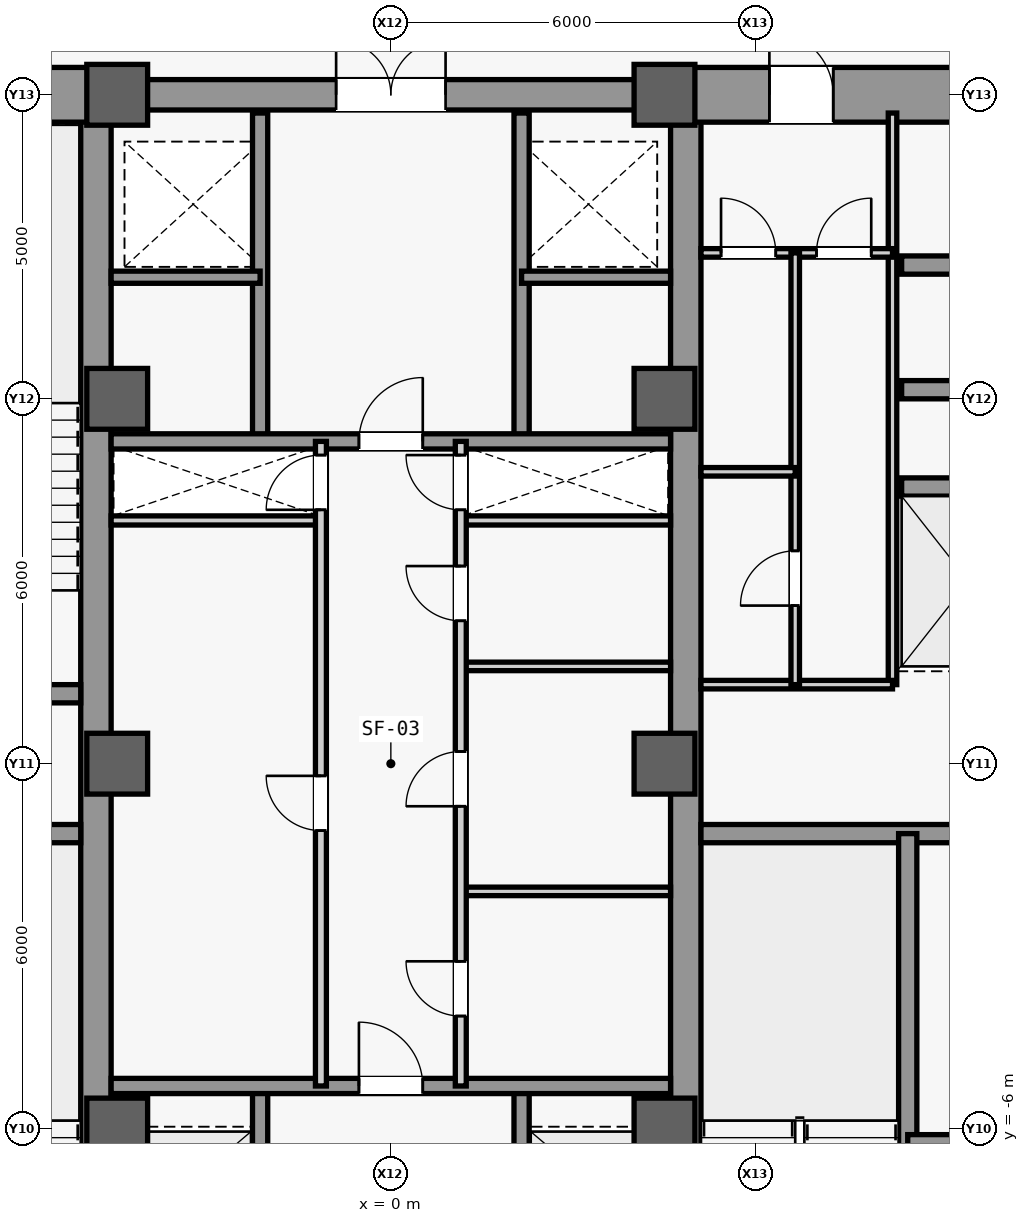
"""IFC4 building model, lengths in metres.
Left out: names, types, materials, properties, quantities, classifications, styles, units other than length and angle.
Written with IfcOpenShell. Run it as: python <this file> out.ifc"""

import sys

from ifc_helpers import new_model, si_unit, direction, frame, frame_2d, origin, origin_2d, place, context, subcontext, project, spatial, rectangle, extrude, source, transform, mapped, element, fill, save


model = new_model("IFC4")
c1 = context("Model", 3, precision=1e-05, world=origin(), true_north=direction((0.0, 1.0)))
c2 = subcontext(c1, "Body", "Model", "MODEL_VIEW")
j1 = project(units=[si_unit("LENGTHUNIT", "METRE"), si_unit("PLANEANGLEUNIT", "RADIAN")], contexts=[c1])
p1 = place(None, origin())
s1 = spatial("IfcSite", under=j1, at=p1, CompositionType="ELEMENT")
p2 = place(p1, origin())
s2 = spatial("IfcBuilding", under=s1, at=p2, CompositionType="ELEMENT")
p3 = place(p2, frame((0.0, 0.0, 45.2)))
s3 = spatial("IfcBuildingStorey", under=s2, at=p3, CompositionType="ELEMENT", Elevation=45.2)
m1 = source(origin(), c2, "Body", "SweptSolid", [
    extrude(rectangle(XDim=21.4, YDim=0.5, at=frame_2d((10.7, 0.0))), origin(), (0.0, 0.0, 1.0), 3.94),
])
for number, where, z_axis, x_axis in (
    (1, (-4.85, -10.7, 0.0), (0.0, 0.0, 1.0), (0.0, 1.0, 0.0)),
    (2, (4.85, -10.7, 0.0), (0.0, 0.0, 1.0), (0.0, 1.0, 0.0)),
):
    element("IfcWall", number, at=place(p3, frame(where, z_axis=z_axis, x_axis=x_axis)), inside=s3, PredefinedType="SHEAR", context=c2, shape_type="MappedRepresentation", body=[
        mapped(m1, transform((0.0, 0.0, 0.0), scale=1.0)),
    ])
m2 = source(origin(), c2, "Body", "SweptSolid", [
    extrude(rectangle(XDim=5.85, YDim=0.9, at=frame_2d((2.925, 0.0))), origin(), (0.0, 0.0, 1.0), 3.94),
])
p4 = place(p3, frame((-10.7, 11.0, 0.0), z_axis=(0.0, 0.0, 1.0), x_axis=(1.0, 0.0, 0.0)))
e3 = element("IfcWall", 3, at=p4, inside=s3, PredefinedType="SHEAR", context=c2, shape_type="MappedRepresentation", body=[
    mapped(m2, transform((0.0, 0.0, 0.0), scale=1.0)),
])
p5 = place(p3, frame((4.85, 11.0, 0.0), z_axis=(0.0, 0.0, 1.0), x_axis=(1.0, 0.0, 0.0)))
e4 = element("IfcWall", 4, at=p5, inside=s3, PredefinedType="SHEAR", context=c2, shape_type="MappedRepresentation", body=[
    mapped(m2, transform((0.0, 0.0, 0.0), scale=1.0)),
])
m3 = source(origin(), c2, "Body", "SweptSolid", [
    extrude(rectangle(XDim=1.05, YDim=2.2, at=frame_2d((0.525, 1.1))), frame((0.0, 0.46, 0.0), z_axis=(0.0, -1.0, 0.0), x_axis=(1.0, 0.0, 0.0)), (0.0, 0.0, 1.0), 0.92),
])
p6 = place(p5, frame((1.375, 0.0, 0.0)))
e5 = element("IfcOpeningElement", 5, at=p6, cuts=e4, PredefinedType="OPENING", context=c2, shape_type="MappedRepresentation", body=[
    mapped(m3, transform((0.0, 0.0, 0.0), scale=1.0)),
])
m4 = source(origin(), c2, "Body", "SweptSolid", [
    extrude(rectangle(XDim=5.6, YDim=0.3, at=frame_2d((2.8, 0.0))), origin(), (0.0, 0.0, 1.0), 3.94),
])
for number, where, z_axis, x_axis in (
    (6, (-10.7, -1.15, 0.0), (0.0, 0.0, 1.0), (1.0, 0.0, 0.0)),
    (7, (-10.7, 1.15, 0.0), (0.0, 0.0, 1.0), (1.0, 0.0, 0.0)),
    (8, (5.1, -1.15, 0.0), (0.0, 0.0, 1.0), (1.0, 0.0, 0.0)),
):
    element("IfcWall", number, at=place(p3, frame(where, z_axis=z_axis, x_axis=x_axis)), inside=s3, PredefinedType="SHEAR", context=c2, shape_type="MappedRepresentation", body=[
        mapped(m4, transform((0.0, 0.0, 0.0), scale=1.0)),
    ])
m5 = source(origin(), c2, "Body", "SweptSolid", [
    extrude(rectangle(XDim=9.2, YDim=0.5, at=frame_2d((4.6, 0.0))), origin(), (0.0, 0.0, 1.0), 3.94),
])
p7 = place(p3, frame((-4.6, 11.0, 0.0), z_axis=(0.0, 0.0, 1.0), x_axis=(1.0, 0.0, 0.0)))
e9 = element("IfcWall", 9, at=p7, inside=s3, PredefinedType="SHEAR", context=c2, shape_type="MappedRepresentation", body=[
    mapped(m5, transform((0.0, 0.0, 0.0), scale=1.0)),
])
m6 = source(origin(), c2, "Body", "SweptSolid", [
    extrude(rectangle(XDim=1.8, YDim=2.25, at=frame_2d((0.9, 1.125))), frame((0.0, 0.26, 0.0), z_axis=(0.0, -1.0, 0.0), x_axis=(1.0, 0.0, 0.0)), (0.0, 0.0, 1.0), 0.52),
])
p8 = place(p7, frame((3.7, 0.0, 0.0)))
e10 = element("IfcOpeningElement", 10, at=p8, cuts=e9, PredefinedType="OPENING", context=c2, shape_type="MappedRepresentation", body=[
    mapped(m6, transform((0.0, 0.0, 0.0), scale=1.0)),
])
m7 = source(origin(), c2, "Body", "SweptSolid", [
    extrude(rectangle(XDim=1.0, YDim=1.0, at=origin_2d()), origin(), (0.0, 0.0, 1.0), 4.2),
])
for number, where, z_axis, x_axis in (
    (11, (-4.5, -6.0, 0.0), (0.0, 0.0, 1.0), (1.0, 0.0, 0.0)),
    (12, (-4.5, 0.0, 0.0), (0.0, 0.0, 1.0), (1.0, 0.0, 0.0)),
    (13, (-4.5, 6.0, 0.0), (0.0, 0.0, 1.0), (1.0, 0.0, 0.0)),
    (14, (-4.5, 11.0, 0.0), (0.0, 0.0, 1.0), (1.0, 0.0, 0.0)),
    (15, (4.5, -6.0, 0.0), (0.0, 0.0, 1.0), (1.0, 0.0, 0.0)),
    (16, (4.5, 0.0, 0.0), (0.0, 0.0, 1.0), (1.0, 0.0, 0.0)),
    (17, (4.5, 6.0, 0.0), (0.0, 0.0, 1.0), (1.0, 0.0, 0.0)),
    (18, (4.5, 11.0, 0.0), (0.0, 0.0, 1.0), (1.0, 0.0, 0.0)),
):
    element("IfcColumn", number, at=place(p3, frame(where, z_axis=z_axis, x_axis=x_axis)), inside=s3, PredefinedType="COLUMN", context=c2, shape_type="MappedRepresentation", body=[
        mapped(m7, transform((0.0, 0.0, 0.0), scale=1.0)),
    ])
m8 = source(origin(), c2, "Body", "SweptSolid", [
    extrude(rectangle(XDim=7.8, YDim=0.3, at=frame_2d((3.9, 0.0))), origin(), (0.0, 0.0, 1.0), 3.94),
])
p9 = place(p3, frame((8.5, -8.95, 0.0), z_axis=(0.0, 0.0, 1.0), x_axis=(0.0, 1.0, 0.0)))
e19 = element("IfcWall", 19, at=p9, inside=s3, PredefinedType="SHEAR", context=c2, shape_type="MappedRepresentation", body=[
    mapped(m8, transform((0.0, 0.0, 0.0), scale=1.0)),
])
m9 = source(origin(), c2, "Body", "SweptSolid", [
    extrude(rectangle(XDim=2.2, YDim=0.3, at=frame_2d((1.1, 0.0))), origin(), (0.0, 0.0, 1.0), 3.94),
])
p10 = place(p3, frame((8.5, -6.25, 0.0), z_axis=(0.0, 0.0, 1.0), x_axis=(1.0, 0.0, 0.0)))
e20 = element("IfcWall", 20, at=p10, inside=s3, PredefinedType="SHEAR", context=c2, shape_type="MappedRepresentation", body=[
    mapped(m9, transform((0.0, 0.0, 0.0), scale=1.0)),
])
m10 = source(origin(), c2, "Body", "SweptSolid", [
    extrude(rectangle(XDim=2.3, YDim=0.3, at=frame_2d((1.15, 0.0))), origin(), (0.0, 0.0, 1.0), 3.94),
])
for number, where, z_axis, x_axis in (
    (21, (8.4, 4.55, 0.0), (0.0, 0.0, 1.0), (1.0, 0.0, 0.0)),
    (22, (8.4, 6.15, 0.0), (0.0, 0.0, 1.0), (1.0, 0.0, 0.0)),
    (23, (8.4, 8.2, 0.0), (0.0, 0.0, 1.0), (1.0, 0.0, 0.0)),
):
    element("IfcWall", number, at=place(p3, frame(where, z_axis=z_axis, x_axis=x_axis)), inside=s3, PredefinedType="SHEAR", context=c2, shape_type="MappedRepresentation", body=[
        mapped(m10, transform((0.0, 0.0, 0.0), scale=1.0)),
    ])
m11 = source(origin(), c2, "Body", "SweptSolid", [
    extrude(rectangle(XDim=9.4, YDim=0.14, at=frame_2d((4.7, 0.0))), origin(), (0.0, 0.0, 1.0), 3.94),
])
p11 = place(p3, frame((8.25, 1.3, 0.0), z_axis=(0.0, 0.0, 1.0), x_axis=(0.0, 1.0, 0.0)))
e24 = element("IfcWall", 24, at=p11, inside=s3, PredefinedType="PARTITIONING", context=c2, shape_type="MappedRepresentation", body=[
    mapped(m11, transform((0.0, 0.0, 0.0), scale=1.0)),
])
m12 = source(origin(), c2, "Body", "SweptSolid", [
    extrude(rectangle(XDim=3.15, YDim=0.14, at=frame_2d((1.575, 0.0))), origin(), (0.0, 0.0, 1.0), 3.94),
])
p12 = place(p3, frame((5.1, 1.3, 0.0), z_axis=(0.0, 0.0, 1.0), x_axis=(1.0, 0.0, 0.0)))
e25 = element("IfcWall", 25, at=p12, inside=s3, PredefinedType="PARTITIONING", context=c2, shape_type="MappedRepresentation", body=[
    mapped(m12, transform((0.0, 0.0, 0.0), scale=1.0)),
])
p13 = place(p3, frame((5.1, 8.4, 0.0), z_axis=(0.0, 0.0, 1.0), x_axis=(1.0, 0.0, 0.0)))
e26 = element("IfcWall", 26, at=p13, inside=s3, PredefinedType="PARTITIONING", context=c2, shape_type="MappedRepresentation", body=[
    mapped(m12, transform((0.0, 0.0, 0.0), scale=1.0)),
])
m13 = source(origin(), c2, "Body", "SweptSolid", [
    extrude(rectangle(XDim=0.9, YDim=2.15, at=frame_2d((0.45, 1.075))), frame((0.0, 0.08, 0.0), z_axis=(0.0, -1.0, 0.0), x_axis=(1.0, 0.0, 0.0)), (0.0, 0.0, 1.0), 0.16),
])
p14 = place(p13, frame((0.33, 0.0, 0.0)))
e27 = element("IfcOpeningElement", 27, at=p14, cuts=e26, PredefinedType="OPENING", context=c2, shape_type="MappedRepresentation", body=[
    mapped(m13, transform((0.0, 0.0, 0.0), scale=1.0)),
])
p15 = place(p13, frame((1.9, 0.0, 0.0)))
e28 = element("IfcOpeningElement", 28, at=p15, cuts=e26, PredefinedType="OPENING", context=c2, shape_type="MappedRepresentation", body=[
    mapped(m13, transform((0.0, 0.0, 0.0), scale=1.0)),
])
m14 = source(origin(), c2, "Body", "SweptSolid", [
    extrude(rectangle(XDim=7.1, YDim=0.14, at=frame_2d((3.55, 0.0))), origin(), (0.0, 0.0, 1.0), 3.94),
])
p16 = place(p3, frame((6.65, 1.3, 0.0), z_axis=(0.0, 0.0, 1.0), x_axis=(0.0, 1.0, 0.0)))
e29 = element("IfcWall", 29, at=p16, inside=s3, PredefinedType="PARTITIONING", context=c2, shape_type="MappedRepresentation", body=[
    mapped(m14, transform((0.0, 0.0, 0.0), scale=1.0)),
])
p17 = place(p16, frame((1.3, 0.0, 0.0)))
e30 = element("IfcOpeningElement", 30, at=p17, cuts=e29, PredefinedType="OPENING", context=c2, shape_type="MappedRepresentation", body=[
    mapped(m13, transform((0.0, 0.0, 0.0), scale=1.0)),
])
m15 = source(origin(), c2, "Body", "SweptSolid", [
    extrude(rectangle(XDim=1.55, YDim=0.14, at=frame_2d((0.775, 0.0))), origin(), (0.0, 0.0, 1.0), 3.94),
])
p18 = place(p3, frame((5.1, 4.8, 0.0), z_axis=(0.0, 0.0, 1.0), x_axis=(1.0, 0.0, 0.0)))
e31 = element("IfcWall", 31, at=p18, inside=s3, PredefinedType="PARTITIONING", context=c2, shape_type="MappedRepresentation", body=[
    mapped(m15, transform((0.0, 0.0, 0.0), scale=1.0)),
])
m16 = source(origin(), c2, "Body", "SweptSolid", [
    extrude(rectangle(XDim=3.45, YDim=0.15, at=frame_2d((1.725, 0.0))), origin(), (0.0, 0.0, 1.0), 3.94),
])
for number, where, z_axis, x_axis in (
    (32, (-4.6, 4.0, 0.0), (0.0, 0.0, 1.0), (1.0, 0.0, 0.0)),
    (33, (1.15, 4.0, 0.0), (0.0, 0.0, 1.0), (1.0, 0.0, 0.0)),
):
    element("IfcWall", number, at=place(p3, frame(where, z_axis=z_axis, x_axis=x_axis)), inside=s3, PredefinedType="PARTITIONING", context=c2, shape_type="MappedRepresentation", body=[
        mapped(m16, transform((0.0, 0.0, 0.0), scale=1.0)),
    ])
m17 = source(origin(), c2, "Body", "SweptSolid", [
    extrude(rectangle(XDim=5.4, YDim=0.25, at=frame_2d((2.7, 0.0))), origin(), (0.0, 0.0, 1.0), 3.94),
])
p19 = place(p3, frame((-2.15, -10.7, 0.0), z_axis=(0.0, 0.0, 1.0), x_axis=(0.0, 1.0, 0.0)))
e34 = element("IfcWall", 34, at=p19, inside=s3, PredefinedType="SHEAR", context=c2, shape_type="MappedRepresentation", body=[
    mapped(m17, transform((0.0, 0.0, 0.0), scale=1.0)),
])
m18 = source(origin(), c2, "Body", "SweptSolid", [
    extrude(rectangle(XDim=1.2, YDim=2.3, at=frame_2d((0.6, 1.15))), frame((0.0, 0.135, 0.0), z_axis=(0.0, -1.0, 0.0), x_axis=(1.0, 0.0, 0.0)), (0.0, 0.0, 1.0), 0.27),
])
p20 = place(p19, frame((0.9, 0.0, 0.0)))
e35 = element("IfcOpeningElement", 35, at=p20, cuts=e34, PredefinedType="OPENING", context=c2, shape_type="MappedRepresentation", body=[
    mapped(m18, transform((0.0, 0.0, 0.0), scale=1.0)),
])
p21 = place(p19, frame((3.2, 0.0, 0.0)))
e36 = element("IfcOpeningElement", 36, at=p21, cuts=e34, PredefinedType="OPENING", context=c2, shape_type="MappedRepresentation", body=[
    mapped(m18, transform((0.0, 0.0, 0.0), scale=1.0)),
])
p22 = place(p3, frame((2.15, -10.7, 0.0), z_axis=(0.0, 0.0, 1.0), x_axis=(0.0, 1.0, 0.0)))
e37 = element("IfcWall", 37, at=p22, inside=s3, PredefinedType="SHEAR", context=c2, shape_type="MappedRepresentation", body=[
    mapped(m17, transform((0.0, 0.0, 0.0), scale=1.0)),
])
p23 = place(p22, frame((0.9, 0.0, 0.0)))
e38 = element("IfcOpeningElement", 38, at=p23, cuts=e37, PredefinedType="OPENING", context=c2, shape_type="MappedRepresentation", body=[
    mapped(m18, transform((0.0, 0.0, 0.0), scale=1.0)),
])
p24 = place(p22, frame((3.2, 0.0, 0.0)))
e39 = element("IfcOpeningElement", 39, at=p24, cuts=e37, PredefinedType="OPENING", context=c2, shape_type="MappedRepresentation", body=[
    mapped(m18, transform((0.0, 0.0, 0.0), scale=1.0)),
])
m19 = source(origin(), c2, "Body", "SweptSolid", [
    extrude(rectangle(XDim=9.2, YDim=0.25, at=frame_2d((4.6, 0.0))), origin(), (0.0, 0.0, 1.0), 3.94),
])
p25 = place(p3, frame((-4.6, -5.3, 0.0), z_axis=(0.0, 0.0, 1.0), x_axis=(1.0, 0.0, 0.0)))
e40 = element("IfcWall", 40, at=p25, inside=s3, PredefinedType="SHEAR", context=c2, shape_type="MappedRepresentation", body=[
    mapped(m19, transform((0.0, 0.0, 0.0), scale=1.0)),
])
m20 = source(origin(), c2, "Body", "SweptSolid", [
    extrude(rectangle(XDim=1.05, YDim=2.2, at=frame_2d((0.525, 1.1))), frame((0.0, 0.135, 0.0), z_axis=(0.0, -1.0, 0.0), x_axis=(1.0, 0.0, 0.0)), (0.0, 0.0, 1.0), 0.27),
])
p26 = place(p25, frame((4.075, 0.0, 0.0)))
e41 = element("IfcOpeningElement", 41, at=p26, cuts=e40, PredefinedType="OPENING", context=c2, shape_type="MappedRepresentation", body=[
    mapped(m20, transform((0.0, 0.0, 0.0), scale=1.0)),
])
for number, where, z_axis, x_axis in (
    (42, (-2.15, 5.3, 0.0), (0.0, 0.0, 1.0), (0.0, 1.0, 0.0)),
    (43, (2.15, 5.3, 0.0), (0.0, 0.0, 1.0), (0.0, 1.0, 0.0)),
):
    element("IfcWall", number, at=place(p3, frame(where, z_axis=z_axis, x_axis=x_axis)), inside=s3, PredefinedType="SHEAR", context=c2, shape_type="MappedRepresentation", body=[
        mapped(m17, transform((0.0, 0.0, 0.0), scale=1.0)),
    ])
m21 = source(origin(), c2, "Body", "SweptSolid", [
    extrude(rectangle(XDim=2.45, YDim=0.2, at=frame_2d((1.225, 0.0))), origin(), (0.0, 0.0, 1.0), 3.94),
])
for number, where, z_axis, x_axis in (
    (44, (-4.6, 8.0, 0.0), (0.0, 0.0, 1.0), (1.0, 0.0, 0.0)),
    (45, (2.15, 8.0, 0.0), (0.0, 0.0, 1.0), (1.0, 0.0, 0.0)),
):
    element("IfcWall", number, at=place(p3, frame(where, z_axis=z_axis, x_axis=x_axis)), inside=s3, PredefinedType="SHEAR", context=c2, shape_type="MappedRepresentation", body=[
        mapped(m21, transform((0.0, 0.0, 0.0), scale=1.0)),
    ])
p27 = place(p3, frame((-4.6, 5.3, 0.0), z_axis=(0.0, 0.0, 1.0), x_axis=(1.0, 0.0, 0.0)))
e46 = element("IfcWall", 46, at=p27, inside=s3, PredefinedType="SHEAR", context=c2, shape_type="MappedRepresentation", body=[
    mapped(m19, transform((0.0, 0.0, 0.0), scale=1.0)),
])
p28 = place(p27, frame((4.075, 0.0, 0.0)))
e47 = element("IfcOpeningElement", 47, at=p28, cuts=e46, PredefinedType="OPENING", context=c2, shape_type="MappedRepresentation", body=[
    mapped(m20, transform((0.0, 0.0, 0.0), scale=1.0)),
])
m22 = source(origin(), c2, "Body", "SweptSolid", [
    extrude(rectangle(XDim=10.6, YDim=0.18, at=frame_2d((5.3, 0.0))), origin(), (0.0, 0.0, 1.0), 3.94),
])
p29 = place(p3, frame((-1.15, -5.3, 0.0), z_axis=(0.0, 0.0, 1.0), x_axis=(0.0, 1.0, 0.0)))
e48 = element("IfcWall", 48, at=p29, inside=s3, PredefinedType="PARTITIONING", context=c2, shape_type="MappedRepresentation", body=[
    mapped(m22, transform((0.0, 0.0, 0.0), scale=1.0)),
])
m23 = source(origin(), c2, "Body", "SweptSolid", [
    extrude(rectangle(XDim=0.9, YDim=2.15, at=frame_2d((0.45, 1.075))), frame((0.0, 0.1, 0.0), z_axis=(0.0, -1.0, 0.0), x_axis=(1.0, 0.0, 0.0)), (0.0, 0.0, 1.0), 0.2),
])
p30 = place(p29, frame((4.2, 0.0, 0.0)))
e49 = element("IfcOpeningElement", 49, at=p30, cuts=e48, PredefinedType="OPENING", context=c2, shape_type="MappedRepresentation", body=[
    mapped(m23, transform((0.0, 0.0, 0.0), scale=1.0)),
])
p31 = place(p29, frame((9.475, 0.0, 0.0)))
e50 = element("IfcOpeningElement", 50, at=p31, cuts=e48, PredefinedType="OPENING", context=c2, shape_type="MappedRepresentation", body=[
    mapped(m23, transform((0.0, 0.0, 0.0), scale=1.0)),
])
m24 = source(origin(), c2, "Body", "SweptSolid", [
    extrude(rectangle(XDim=3.45, YDim=0.14, at=frame_2d((1.725, 0.0))), origin(), (0.0, 0.0, 1.0), 3.94),
])
for number, where, z_axis, x_axis in (
    (51, (1.15, -2.1, 0.0), (0.0, 0.0, 1.0), (1.0, 0.0, 0.0)),
    (52, (1.15, 1.6, 0.0), (0.0, 0.0, 1.0), (1.0, 0.0, 0.0)),
):
    element("IfcWall", number, at=place(p3, frame(where, z_axis=z_axis, x_axis=x_axis)), inside=s3, PredefinedType="PARTITIONING", context=c2, shape_type="MappedRepresentation", body=[
        mapped(m24, transform((0.0, 0.0, 0.0), scale=1.0)),
    ])
p32 = place(p3, frame((1.15, -5.3, 0.0), z_axis=(0.0, 0.0, 1.0), x_axis=(0.0, 1.0, 0.0)))
e53 = element("IfcWall", 53, at=p32, inside=s3, PredefinedType="PARTITIONING", context=c2, shape_type="MappedRepresentation", body=[
    mapped(m22, transform((0.0, 0.0, 0.0), scale=1.0)),
])
p33 = place(p32, frame((1.15, 0.0, 0.0)))
e54 = element("IfcOpeningElement", 54, at=p33, cuts=e53, PredefinedType="OPENING", context=c2, shape_type="MappedRepresentation", body=[
    mapped(m23, transform((0.0, 0.0, 0.0), scale=1.0)),
])
p34 = place(p32, frame((4.6, 0.0, 0.0)))
e55 = element("IfcOpeningElement", 55, at=p34, cuts=e53, PredefinedType="OPENING", context=c2, shape_type="MappedRepresentation", body=[
    mapped(m23, transform((0.0, 0.0, 0.0), scale=1.0)),
])
p35 = place(p32, frame((7.65, 0.0, 0.0)))
e56 = element("IfcOpeningElement", 56, at=p35, cuts=e53, PredefinedType="OPENING", context=c2, shape_type="MappedRepresentation", body=[
    mapped(m23, transform((0.0, 0.0, 0.0), scale=1.0)),
])
p36 = place(p32, frame((9.475, 0.0, 0.0)))
e57 = element("IfcOpeningElement", 57, at=p36, cuts=e53, PredefinedType="OPENING", context=c2, shape_type="MappedRepresentation", body=[
    mapped(m23, transform((0.0, 0.0, 0.0), scale=1.0)),
])
m25 = source(origin(), c2, "Body", "SweptSolid", [
    extrude(rectangle(XDim=1.05, YDim=2.2, at=frame_2d((0.525, 1.1))), frame((0.0, 0.025, 0.0), z_axis=(0.0, -1.0, 0.0), x_axis=(1.0, 0.0, 0.0)), (0.0, 0.0, 1.0), 0.05),
])
p37 = place(p6, origin())
e58 = element("IfcDoor", 58, at=p37, inside=s3, OperationType="SINGLE_SWING_LEFT", PredefinedType="DOOR", context=c2, shape_type="MappedRepresentation", body=[
    mapped(m25, transform((0.0, 0.0, 0.0), scale=1.0)),
])
fill(e5, e58)
m26 = source(origin(), c2, "Body", "SweptSolid", [
    extrude(rectangle(XDim=0.9, YDim=2.15, at=frame_2d((0.45, 1.075))), frame((0.0, 0.025, 0.0), z_axis=(0.0, -1.0, 0.0), x_axis=(1.0, 0.0, 0.0)), (0.0, 0.0, 1.0), 0.05),
])
p38 = place(p14, origin())
e59 = element("IfcDoor", 59, at=p38, inside=s3, OperationType="SINGLE_SWING_LEFT", PredefinedType="DOOR", context=c2, shape_type="MappedRepresentation", body=[
    mapped(m26, transform((0.0, 0.0, 0.0), scale=1.0)),
])
fill(e27, e59)
p39 = place(p15, origin())
e60 = element("IfcDoor", 60, at=p39, inside=s3, OperationType="SINGLE_SWING_RIGHT", PredefinedType="DOOR", context=c2, shape_type="MappedRepresentation", body=[
    mapped(m26, transform((0.0, 0.0, 0.0), scale=1.0)),
])
fill(e28, e60)
p40 = place(p17, origin())
e61 = element("IfcDoor", 61, at=p40, inside=s3, OperationType="SINGLE_SWING_LEFT", PredefinedType="DOOR", context=c2, shape_type="MappedRepresentation", body=[
    mapped(m26, transform((0.0, 0.0, 0.0), scale=1.0)),
])
fill(e30, e61)
p41 = place(p26, origin())
e62 = element("IfcDoor", 62, at=p41, inside=s3, OperationType="SINGLE_SWING_LEFT", PredefinedType="DOOR", context=c2, shape_type="MappedRepresentation", body=[
    mapped(m25, transform((0.0, 0.0, 0.0), scale=1.0)),
])
fill(e41, e62)
p42 = place(p28, origin())
e63 = element("IfcDoor", 63, at=p42, inside=s3, OperationType="SINGLE_SWING_RIGHT", PredefinedType="DOOR", context=c2, shape_type="MappedRepresentation", body=[
    mapped(m25, transform((0.0, 0.0, 0.0), scale=1.0)),
])
fill(e47, e63)
m27 = source(origin(), c2, "Body", "SweptSolid", [
    extrude(rectangle(XDim=1.8, YDim=2.25, at=frame_2d((0.9, 1.125))), frame((0.0, 0.025, 0.0), z_axis=(0.0, -1.0, 0.0), x_axis=(1.0, 0.0, 0.0)), (0.0, 0.0, 1.0), 0.05),
])
p43 = place(p8, origin())
e64 = element("IfcDoor", 64, at=p43, inside=s3, OperationType="SINGLE_SWING_RIGHT", PredefinedType="DOOR", context=c2, shape_type="MappedRepresentation", body=[
    mapped(m27, transform((0.0, 0.0, 0.0), scale=1.0)),
])
fill(e10, e64)
p44 = place(p30, origin())
e65 = element("IfcDoor", 65, at=p44, inside=s3, OperationType="SINGLE_SWING_RIGHT", PredefinedType="DOOR", context=c2, shape_type="MappedRepresentation", body=[
    mapped(m26, transform((0.0, 0.0, 0.0), scale=1.0)),
])
fill(e49, e65)
p45 = place(p33, origin())
e66 = element("IfcDoor", 66, at=p45, inside=s3, OperationType="SINGLE_SWING_RIGHT", PredefinedType="DOOR", context=c2, shape_type="MappedRepresentation", body=[
    mapped(m26, transform((0.0, 0.0, 0.0), scale=1.0)),
])
fill(e54, e66)
p46 = place(p34, origin())
e67 = element("IfcDoor", 67, at=p46, inside=s3, OperationType="SINGLE_SWING_LEFT", PredefinedType="DOOR", context=c2, shape_type="MappedRepresentation", body=[
    mapped(m26, transform((0.0, 0.0, 0.0), scale=1.0)),
])
fill(e55, e67)
p47 = place(p35, origin())
e68 = element("IfcDoor", 68, at=p47, inside=s3, OperationType="SINGLE_SWING_RIGHT", PredefinedType="DOOR", context=c2, shape_type="MappedRepresentation", body=[
    mapped(m26, transform((0.0, 0.0, 0.0), scale=1.0)),
])
fill(e56, e68)
p48 = place(p31, origin())
e69 = element("IfcDoor", 69, at=p48, inside=s3, OperationType="SINGLE_SWING_LEFT", PredefinedType="DOOR", context=c2, shape_type="MappedRepresentation", body=[
    mapped(m26, transform((0.0, 0.0, 0.0), scale=1.0)),
])
fill(e50, e69)
p49 = place(p36, origin())
e70 = element("IfcDoor", 70, at=p49, inside=s3, OperationType="SINGLE_SWING_RIGHT", PredefinedType="DOOR", context=c2, shape_type="MappedRepresentation", body=[
    mapped(m26, transform((0.0, 0.0, 0.0), scale=1.0)),
])
fill(e57, e70)
save(model, sys.argv[1])
